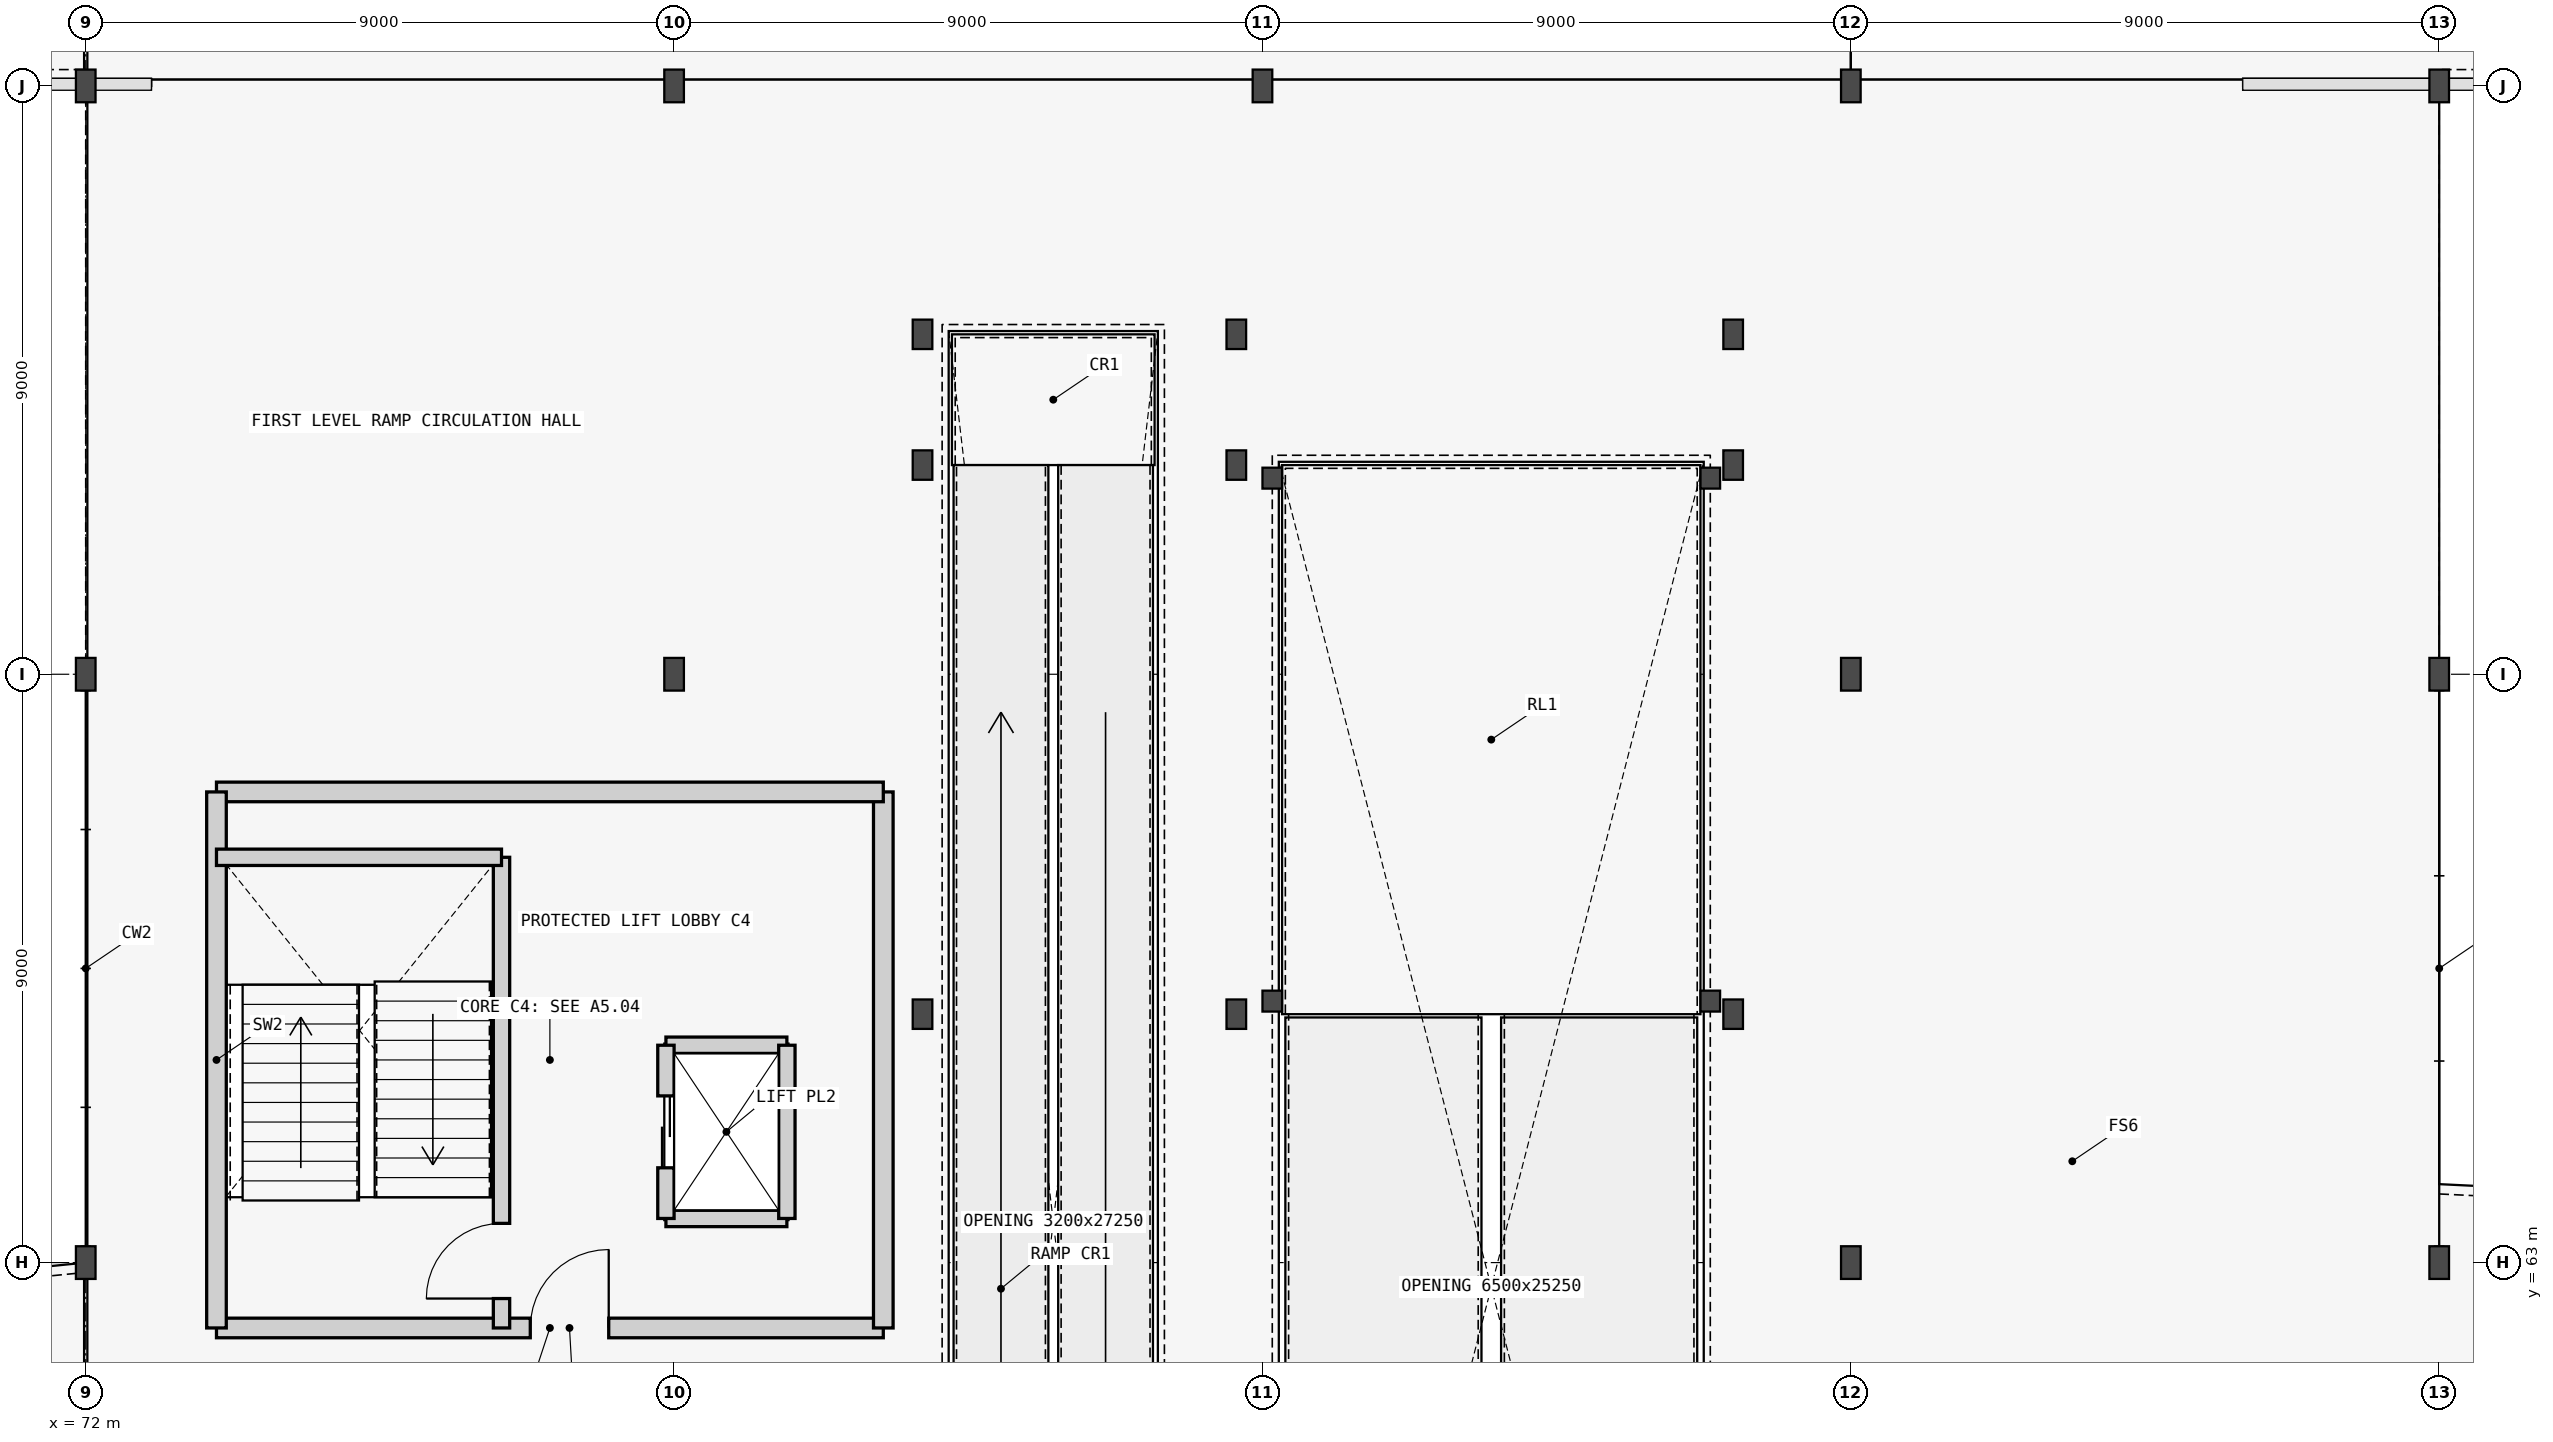
"""IFC4 building model, lengths in metres.
Left out: names, types, materials, properties, quantities, classifications, styles, units other than length and angle.
Written with IfcOpenShell. Run it as: python <this file> out.ifc"""

import sys

from ifc_helpers import new_model, si_unit, direction, frame, frame_2d, origin, origin_2d, place, context, subcontext, project, spatial, rectangle, i_section, extrude, element, fill, save


model = new_model("IFC4")
c1 = context("Model", 3, precision=1e-05, world=origin(), true_north=direction((0.0, 1.0)))
c2 = subcontext(c1, "Body", "Model", "MODEL_VIEW")
j1 = project(units=[si_unit("LENGTHUNIT", "METRE"), si_unit("PLANEANGLEUNIT", "RADIAN")], contexts=[c1])
p1 = place(None, origin())
s1 = spatial("IfcSite", under=j1, at=p1, CompositionType="ELEMENT")
p2 = place(p1, origin())
s2 = spatial("IfcBuilding", under=s1, at=p2, CompositionType="ELEMENT")
p3 = place(p2, frame((0.0, 0.0, 4.2)))
s3 = spatial("IfcBuildingStorey", under=s2, at=p3, CompositionType="ELEMENT", Elevation=4.2)
for number, where, z_axis, x_axis in (
    (1, (72.0, 63.0, 0.0), (0.0, 0.0, 1.0), (1.0, 0.0, 0.0)),
    (2, (72.0, 72.0, 0.0), (0.0, 0.0, 1.0), (1.0, 0.0, 0.0)),
    (3, (72.0, 81.0, 0.0), (0.0, 0.0, 1.0), (1.0, 0.0, 0.0)),
    (4, (81.0, 72.0, 0.0), (0.0, 0.0, 1.0), (1.0, 0.0, 0.0)),
    (5, (81.0, 81.0, 0.0), (0.0, 0.0, 1.0), (1.0, 0.0, 0.0)),
    (6, (99.0, 63.0, 0.0), (0.0, 0.0, 1.0), (1.0, 0.0, 0.0)),
    (7, (99.0, 72.0, 0.0), (0.0, 0.0, 1.0), (1.0, 0.0, 0.0)),
    (8, (99.0, 81.0, 0.0), (0.0, 0.0, 1.0), (1.0, 0.0, 0.0)),
    (9, (108.0, 63.0, 0.0), (0.0, 0.0, 1.0), (1.0, 0.0, 0.0)),
    (10, (108.0, 72.0, 0.0), (0.0, 0.0, 1.0), (1.0, 0.0, 0.0)),
    (11, (108.0, 81.0, 0.0), (0.0, 0.0, 1.0), (1.0, 0.0, 0.0)),
):
    element("IfcColumn", number, at=place(p3, frame(where, z_axis=z_axis, x_axis=x_axis)), inside=s3, PredefinedType="COLUMN", context=c2, shape_type="SweptSolid", body=[
        extrude(i_section(OverallWidth=0.3, OverallDepth=0.5, WebThickness=0.014, FlangeThickness=0.028, FilletRadius=0.027, at=origin_2d()), origin(), (0.0, 0.0, 1.0), 4.2),
    ])
for number, where, z_axis, x_axis in (
    (12, (84.8, 66.8, 0.0), (0.0, 0.0, 1.0), (1.0, 0.0, 0.0)),
    (13, (84.8, 75.2, 0.0), (0.0, 0.0, 1.0), (1.0, 0.0, 0.0)),
    (14, (84.8, 77.2, 0.0), (0.0, 0.0, 1.0), (1.0, 0.0, 0.0)),
    (15, (89.6, 66.8, 0.0), (0.0, 0.0, 1.0), (1.0, 0.0, 0.0)),
    (16, (89.6, 75.2, 0.0), (0.0, 0.0, 1.0), (1.0, 0.0, 0.0)),
    (17, (89.6, 77.2, 0.0), (0.0, 0.0, 1.0), (1.0, 0.0, 0.0)),
    (18, (97.2, 66.8, 0.0), (0.0, 0.0, 1.0), (1.0, 0.0, 0.0)),
    (19, (97.2, 75.2, 0.0), (0.0, 0.0, 1.0), (1.0, 0.0, 0.0)),
    (20, (97.2, 77.2, 0.0), (0.0, 0.0, 1.0), (1.0, 0.0, 0.0)),
):
    element("IfcColumn", number, at=place(p3, frame(where, z_axis=z_axis, x_axis=x_axis)), inside=s3, PredefinedType="COLUMN", context=c2, shape_type="SweptSolid", body=[
        extrude(i_section(OverallWidth=0.3, OverallDepth=0.45, WebThickness=0.014, FlangeThickness=0.026, FilletRadius=0.027, at=origin_2d()), origin(), (0.0, 0.0, 1.0), 4.2),
    ])
p4 = place(p3, frame((90.0, 81.0, 0.0), z_axis=(0.0, 0.0, 1.0), x_axis=(1.0, 0.0, 0.0)))
e21 = element("IfcColumn", 21, at=p4, inside=s3, PredefinedType="COLUMN", context=c2, shape_type="SweptSolid", body=[
    extrude(i_section(OverallWidth=0.3, OverallDepth=0.5, WebThickness=0.014, FlangeThickness=0.028, FilletRadius=0.027, at=origin_2d()), origin(), (0.0, 0.0, 1.0), 4.2),
])
for number, where, z_axis, x_axis in (
    (22, (90.15, 67.0, 0.0), (0.0, 0.0, 1.0), (1.0, 0.0, 0.0)),
    (23, (90.15, 75.0, 0.0), (0.0, 0.0, 1.0), (1.0, 0.0, 0.0)),
    (24, (96.85, 67.0, 0.0), (0.0, 0.0, 1.0), (1.0, 0.0, 0.0)),
    (25, (96.85, 75.0, 0.0), (0.0, 0.0, 1.0), (1.0, 0.0, 0.0)),
):
    element("IfcColumn", number, at=place(p3, frame(where, z_axis=z_axis, x_axis=x_axis)), inside=s3, PredefinedType="COLUMN", context=c2, shape_type="SweptSolid", body=[
        extrude(i_section(OverallWidth=0.3, OverallDepth=0.32, WebThickness=0.011, FlangeThickness=0.021, FilletRadius=0.027, at=origin_2d()), origin(), (0.0, 0.0, 1.0), 4.2),
    ])
p5 = place(p3, frame((74.0, 62.0, 0.0), z_axis=(0.0, 0.0, 1.0), x_axis=(1.0, 0.0, 0.0)))
e26 = element("IfcWall", 26, at=p5, inside=s3, PredefinedType="SHEAR", context=c2, shape_type="SweptSolid", body=[
    extrude(rectangle(XDim=10.2, YDim=0.3, at=frame_2d((5.1, 0.0))), origin(), (0.0, 0.0, 1.0), 3.945),
])
p6 = place(p5, frame((4.8, 0.0, 0.0)))
e27 = element("IfcOpeningElement", 27, at=p6, cuts=e26, PredefinedType="OPENING", context=c2, shape_type="SweptSolid", body=[
    extrude(rectangle(XDim=1.2, YDim=2.15, at=frame_2d((0.6, 1.075))), frame((0.0, 0.16, 0.0), z_axis=(0.0, -1.0, 0.0), x_axis=(1.0, 0.0, 0.0)), (0.0, 0.0, 1.0), 0.32),
])
p7 = place(p3, frame((84.2, 62.0, 0.0), z_axis=(0.0, 0.0, 1.0), x_axis=(0.0, 1.0, 0.0)))
e28 = element("IfcWall", 28, at=p7, inside=s3, PredefinedType="SHEAR", context=c2, shape_type="SweptSolid", body=[
    extrude(rectangle(XDim=8.2, YDim=0.3, at=frame_2d((4.1, 0.0))), origin(), (0.0, 0.0, 1.0), 3.945),
])
p8 = place(p3, frame((84.2, 70.2, 0.0), z_axis=(0.0, 0.0, 1.0), x_axis=(-1.0, 0.0, 0.0)))
e29 = element("IfcWall", 29, at=p8, inside=s3, PredefinedType="SHEAR", context=c2, shape_type="SweptSolid", body=[
    extrude(rectangle(XDim=10.2, YDim=0.3, at=frame_2d((5.1, 0.0))), origin(), (0.0, 0.0, 1.0), 3.945),
])
p9 = place(p3, frame((74.0, 70.2, 0.0), z_axis=(0.0, 0.0, 1.0), x_axis=(0.0, -1.0, 0.0)))
e30 = element("IfcWall", 30, at=p9, inside=s3, PredefinedType="SHEAR", context=c2, shape_type="SweptSolid", body=[
    extrude(rectangle(XDim=8.2, YDim=0.3, at=frame_2d((4.1, 0.0))), origin(), (0.0, 0.0, 1.0), 3.945),
])
p10 = place(p3, frame((78.36, 62.0, 0.0), z_axis=(0.0, 0.0, 1.0), x_axis=(0.0, 1.0, 0.0)))
e31 = element("IfcWall", 31, at=p10, inside=s3, PredefinedType="SHEAR", context=c2, shape_type="SweptSolid", body=[
    extrude(rectangle(XDim=7.2, YDim=0.25, at=frame_2d((3.6, 0.0))), origin(), (0.0, 0.0, 1.0), 3.945),
])
p11 = place(p10, frame((0.45, 0.0, 0.0)))
e32 = element("IfcOpeningElement", 32, at=p11, cuts=e31, PredefinedType="OPENING", context=c2, shape_type="SweptSolid", body=[
    extrude(rectangle(XDim=1.15, YDim=2.15, at=frame_2d((0.575, 1.075))), frame((0.0, 0.135, 0.0), z_axis=(0.0, -1.0, 0.0), x_axis=(1.0, 0.0, 0.0)), (0.0, 0.0, 1.0), 0.27),
])
p12 = place(p3, frame((74.0, 69.2, 0.0), z_axis=(0.0, 0.0, 1.0), x_axis=(1.0, 0.0, 0.0)))
e33 = element("IfcWall", 33, at=p12, inside=s3, PredefinedType="SHEAR", context=c2, shape_type="SweptSolid", body=[
    extrude(rectangle(XDim=4.36, YDim=0.25, at=frame_2d((2.18, 0.0))), origin(), (0.0, 0.0, 1.0), 3.945),
])
for number, where, z_axis, x_axis in (
    (34, (80.875, 63.675, 0.0), (0.0, 0.0, 1.0), (1.0, 0.0, 0.0)),
    (35, (80.875, 66.325, 0.0), (0.0, 0.0, 1.0), (1.0, 0.0, 0.0)),
):
    element("IfcWall", number, at=place(p3, frame(where, z_axis=z_axis, x_axis=x_axis)), inside=s3, PredefinedType="SHEAR", context=c2, shape_type="SweptSolid", body=[
        extrude(rectangle(XDim=1.85, YDim=0.25, at=frame_2d((0.925, 0.0))), origin(), (0.0, 0.0, 1.0), 3.945),
    ])
p13 = place(p3, frame((82.725, 63.675, 0.0), z_axis=(0.0, 0.0, 1.0), x_axis=(0.0, 1.0, 0.0)))
e36 = element("IfcWall", 36, at=p13, inside=s3, PredefinedType="SHEAR", context=c2, shape_type="SweptSolid", body=[
    extrude(rectangle(XDim=2.65, YDim=0.25, at=frame_2d((1.325, 0.0))), origin(), (0.0, 0.0, 1.0), 3.945),
])
p14 = place(p3, frame((80.875, 63.675, 0.0), z_axis=(0.0, 0.0, 1.0), x_axis=(0.0, 1.0, 0.0)))
e37 = element("IfcWall", 37, at=p14, inside=s3, PredefinedType="SHEAR", context=c2, shape_type="SweptSolid", body=[
    extrude(rectangle(XDim=2.65, YDim=0.25, at=frame_2d((1.325, 0.0))), origin(), (0.0, 0.0, 1.0), 3.945),
])
p15 = place(p14, frame((0.775, 0.0, 0.0)))
e38 = element("IfcOpeningElement", 38, at=p15, cuts=e37, PredefinedType="OPENING", context=c2, shape_type="SweptSolid", body=[
    extrude(rectangle(XDim=1.1, YDim=2.15, at=frame_2d((0.55, 1.075))), frame((0.0, 0.135, 0.0), z_axis=(0.0, -1.0, 0.0), x_axis=(1.0, 0.0, 0.0)), (0.0, 0.0, 1.0), 0.27),
])
p16 = place(p11, origin())
e39 = element("IfcDoor", 39, at=p16, inside=s3, OperationType="SINGLE_SWING_LEFT", PredefinedType="DOOR", context=c2, shape_type="SweptSolid", body=[
    extrude(rectangle(XDim=1.15, YDim=2.15, at=frame_2d((0.575, 1.075))), frame((0.0, 0.025, 0.0), z_axis=(0.0, -1.0, 0.0), x_axis=(1.0, 0.0, 0.0)), (0.0, 0.0, 1.0), 0.05),
])
fill(e32, e39)
p17 = place(p6, origin())
e40 = element("IfcDoor", 40, at=p17, inside=s3, OperationType="SINGLE_SWING_RIGHT", PredefinedType="DOOR", context=c2, shape_type="SweptSolid", body=[
    extrude(rectangle(XDim=1.2, YDim=2.15, at=frame_2d((0.6, 1.075))), frame((0.0, 0.025, 0.0), z_axis=(0.0, -1.0, 0.0), x_axis=(1.0, 0.0, 0.0)), (0.0, 0.0, 1.0), 0.05),
])
fill(e27, e40)
p18 = place(p15, origin())
e41 = element("IfcDoor", 41, at=p18, inside=s3, OperationType="DOUBLE_DOOR_SLIDING", PredefinedType="USERDEFINED", context=c2, shape_type="SweptSolid", body=[
    extrude(rectangle(XDim=1.1, YDim=2.15, at=frame_2d((0.55, 1.075))), frame((0.0, 0.025, 0.0), z_axis=(0.0, -1.0, 0.0), x_axis=(1.0, 0.0, 0.0)), (0.0, 0.0, 1.0), 0.05),
])
fill(e38, e41)
save(model, sys.argv[1])
